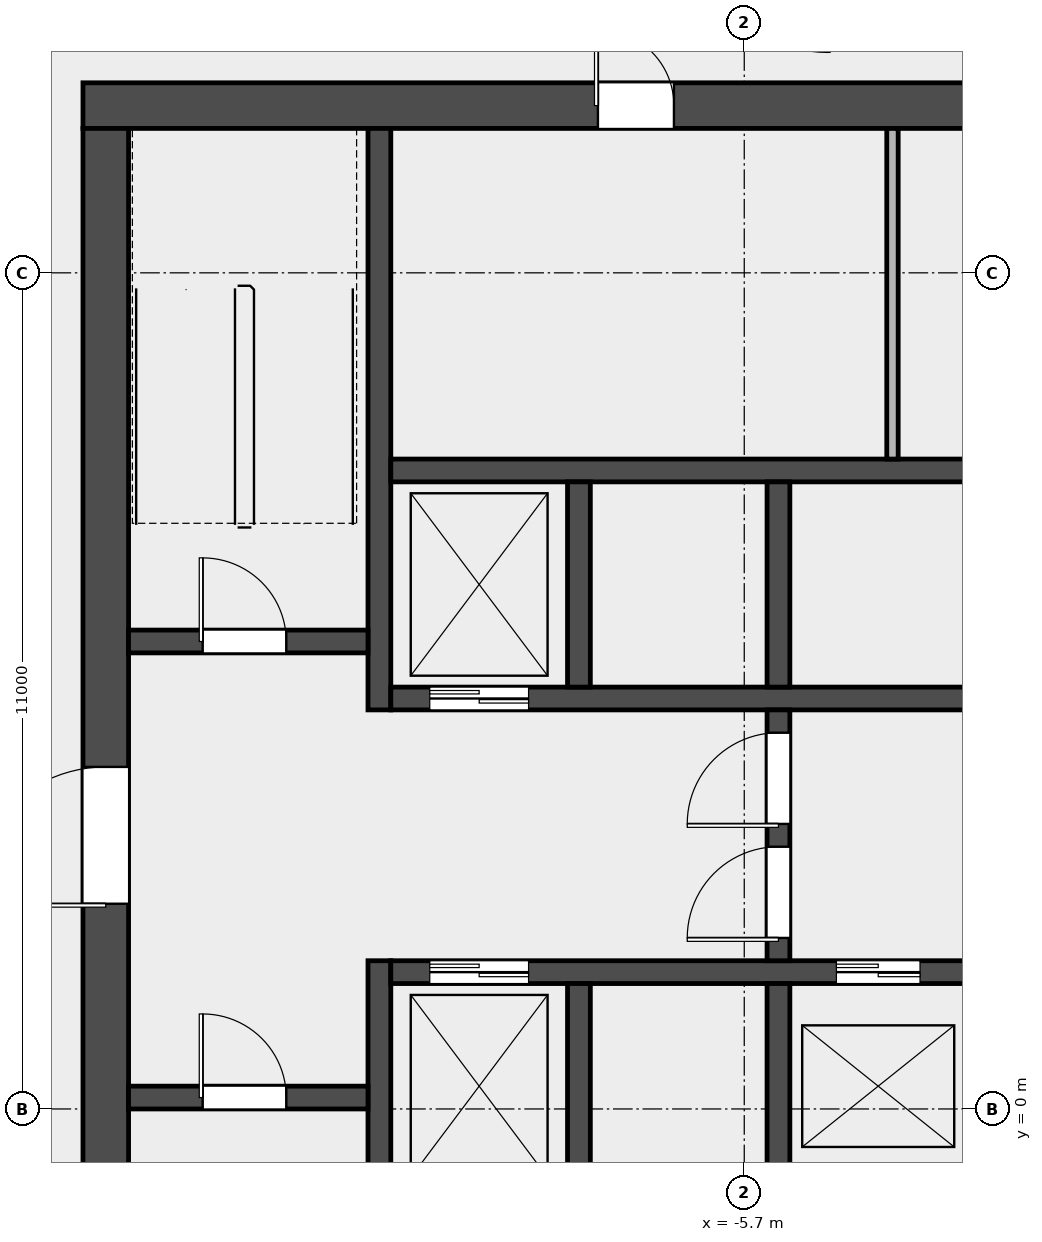
"""IFC4 building model, lengths in metres.
Left out: names, types, materials, properties, quantities, classifications, styles, units other than length and angle.
Written with IfcOpenShell. Run it as: python <this file> out.ifc"""

import sys

from ifc_helpers import new_model, si_unit, direction, frame, frame_2d, origin, place, context, subcontext, project, spatial, rectangle, extrude, element, fill, save


model = new_model("IFC4")
c1 = context("Model", 3, precision=1e-05, world=origin(), true_north=direction((0.0, 1.0)))
c2 = subcontext(c1, "Body", "Model", "MODEL_VIEW")
j1 = project(units=[si_unit("LENGTHUNIT", "METRE"), si_unit("PLANEANGLEUNIT", "RADIAN")], contexts=[c1])
p1 = place(None, origin())
s1 = spatial("IfcSite", under=j1, at=p1, CompositionType="ELEMENT")
p2 = place(p1, origin())
s2 = spatial("IfcBuilding", under=s1, at=p2, CompositionType="ELEMENT")
p3 = place(p2, frame((0.0, 0.0, 201.0)))
s3 = spatial("IfcBuildingStorey", under=s2, at=p3, CompositionType="ELEMENT", Elevation=201.0)
p4 = place(p3, frame((-14.4, 13.2, 0.0), z_axis=(0.0, 0.0, 1.0), x_axis=(1.0, 0.0, 0.0)))
e1 = element("IfcWall", 1, at=p4, inside=s3, PredefinedType="SHEAR", context=c2, shape_type="SweptSolid", body=[
    extrude(rectangle(XDim=28.8, YDim=0.6, at=frame_2d((14.4, 0.0))), origin(), (0.0, 0.0, 1.0), 3.7),
])
p5 = place(p4, frame((6.775, 0.0, 0.0)))
e2 = element("IfcOpeningElement", 2, at=p5, cuts=e1, PredefinedType="OPENING", context=c2, shape_type="SweptSolid", body=[
    extrude(rectangle(XDim=1.0, YDim=2.1, at=frame_2d((0.5, 1.05))), frame((0.0, 0.312, 0.0), z_axis=(0.0, -1.0, 0.0), x_axis=(1.0, 0.0, 0.0)), (0.0, 0.0, 1.0), 0.624),
])
p6 = place(p4, frame((13.525, 0.0, 0.0)))
e3 = element("IfcOpeningElement", 3, at=p6, cuts=e1, PredefinedType="OPENING", context=c2, shape_type="SweptSolid", body=[
    extrude(rectangle(XDim=1.0, YDim=2.1, at=frame_2d((0.5, 1.05))), frame((0.0, 0.312, 0.0), z_axis=(0.0, -1.0, 0.0), x_axis=(1.0, 0.0, 0.0)), (0.0, 0.0, 1.0), 0.624),
])
p7 = place(p4, frame((20.65, 0.0, 0.0)))
e4 = element("IfcOpeningElement", 4, at=p7, cuts=e1, PredefinedType="OPENING", context=c2, shape_type="SweptSolid", body=[
    extrude(rectangle(XDim=1.0, YDim=2.1, at=frame_2d((0.5, 1.05))), frame((0.0, 0.312, 0.0), z_axis=(0.0, -1.0, 0.0), x_axis=(1.0, 0.0, 0.0)), (0.0, 0.0, 1.0), 0.624),
])
p8 = place(p3, frame((-14.1, -6.6, 0.0), z_axis=(0.0, 0.0, 1.0), x_axis=(0.0, 1.0, 0.0)))
e5 = element("IfcWall", 5, at=p8, inside=s3, PredefinedType="SHEAR", context=c2, shape_type="SweptSolid", body=[
    extrude(rectangle(XDim=19.5, YDim=0.6, at=frame_2d((9.75, 0.0))), origin(), (0.0, 0.0, 1.0), 3.7),
])
p9 = place(p8, frame((9.3, 0.0, 0.0)))
e6 = element("IfcOpeningElement", 6, at=p9, cuts=e5, PredefinedType="OPENING", context=c2, shape_type="SweptSolid", body=[
    extrude(rectangle(XDim=1.8, YDim=2.1, at=frame_2d((0.9, 1.05))), frame((0.0, 0.312, 0.0), z_axis=(0.0, -1.0, 0.0), x_axis=(1.0, 0.0, 0.0)), (0.0, 0.0, 1.0), 0.624),
])
p10 = place(p3, frame((-10.5, -6.6, 0.0), z_axis=(0.0, 0.0, 1.0), x_axis=(0.0, 1.0, 0.0)))
e7 = element("IfcWall", 7, at=p10, inside=s3, PredefinedType="SHEAR", context=c2, shape_type="SweptSolid", body=[
    extrude(rectangle(XDim=8.55, YDim=0.3, at=frame_2d((4.275, 0.0))), origin(), (0.0, 0.0, 1.0), 3.7),
])
p11 = place(p3, frame((-10.5, 5.25, 0.0), z_axis=(0.0, 0.0, 1.0), x_axis=(0.0, 1.0, 0.0)))
e8 = element("IfcWall", 8, at=p11, inside=s3, PredefinedType="SHEAR", context=c2, shape_type="SweptSolid", body=[
    extrude(rectangle(XDim=7.65, YDim=0.3, at=frame_2d((3.825, 0.0))), origin(), (0.0, 0.0, 1.0), 3.7),
])
p12 = place(p3, frame((-13.8, 0.15, 0.0), z_axis=(0.0, 0.0, 1.0), x_axis=(1.0, 0.0, 0.0)))
e9 = element("IfcWall", 9, at=p12, inside=s3, PredefinedType="SOLIDWALL", context=c2, shape_type="SweptSolid", body=[
    extrude(rectangle(XDim=3.15, YDim=0.3, at=frame_2d((1.575, 0.0))), origin(), (0.0, 0.0, 1.0), 3.7),
])
p13 = place(p12, frame((0.975, 0.0, 0.0)))
e10 = element("IfcOpeningElement", 10, at=p13, cuts=e9, PredefinedType="OPENING", context=c2, shape_type="SweptSolid", body=[
    extrude(rectangle(XDim=1.1, YDim=2.1, at=frame_2d((0.55, 1.05))), frame((0.0, 0.162, 0.0), z_axis=(0.0, -1.0, 0.0), x_axis=(1.0, 0.0, 0.0)), (0.0, 0.0, 1.0), 0.324),
])
p14 = place(p3, frame((-13.8, 6.15, 0.0), z_axis=(0.0, 0.0, 1.0), x_axis=(1.0, 0.0, 0.0)))
e11 = element("IfcWall", 11, at=p14, inside=s3, PredefinedType="SOLIDWALL", context=c2, shape_type="SweptSolid", body=[
    extrude(rectangle(XDim=3.15, YDim=0.3, at=frame_2d((1.575, 0.0))), origin(), (0.0, 0.0, 1.0), 3.7),
])
p15 = place(p14, frame((0.975, 0.0, 0.0)))
e12 = element("IfcOpeningElement", 12, at=p15, cuts=e11, PredefinedType="OPENING", context=c2, shape_type="SweptSolid", body=[
    extrude(rectangle(XDim=1.1, YDim=2.1, at=frame_2d((0.55, 1.05))), frame((0.0, 0.162, 0.0), z_axis=(0.0, -1.0, 0.0), x_axis=(1.0, 0.0, 0.0)), (0.0, 0.0, 1.0), 0.324),
])
p16 = place(p3, frame((-10.35, 1.8, 0.0), z_axis=(0.0, 0.0, 1.0), x_axis=(1.0, 0.0, 0.0)))
e13 = element("IfcWall", 13, at=p16, inside=s3, PredefinedType="SOLIDWALL", context=c2, shape_type="SweptSolid", body=[
    extrude(rectangle(XDim=20.7, YDim=0.3, at=frame_2d((10.35, 0.0))), origin(), (0.0, 0.0, 1.0), 3.7),
])
p17 = place(p16, frame((0.512, 0.0, 0.0)))
e14 = element("IfcOpeningElement", 14, at=p17, cuts=e13, PredefinedType="OPENING", context=c2, shape_type="SweptSolid", body=[
    extrude(rectangle(XDim=1.3, YDim=2.1, at=frame_2d((0.65, 1.05))), frame((0.0, 0.162, 0.0), z_axis=(0.0, -1.0, 0.0), x_axis=(1.0, 0.0, 0.0)), (0.0, 0.0, 1.0), 0.324),
])
p18 = place(p16, frame((5.863, 0.0, 0.0)))
e15 = element("IfcOpeningElement", 15, at=p18, cuts=e13, PredefinedType="OPENING", context=c2, shape_type="SweptSolid", body=[
    extrude(rectangle(XDim=1.1, YDim=2.1, at=frame_2d((0.55, 1.05))), frame((0.0, 0.162, 0.0), z_axis=(0.0, -1.0, 0.0), x_axis=(1.0, 0.0, 0.0)), (0.0, 0.0, 1.0), 0.324),
])
p19 = place(p16, frame((8.488, 0.0, 0.0)))
e16 = element("IfcOpeningElement", 16, at=p19, cuts=e13, PredefinedType="OPENING", context=c2, shape_type="SweptSolid", body=[
    extrude(rectangle(XDim=1.1, YDim=2.1, at=frame_2d((0.55, 1.05))), frame((0.0, 0.162, 0.0), z_axis=(0.0, -1.0, 0.0), x_axis=(1.0, 0.0, 0.0)), (0.0, 0.0, 1.0), 0.324),
])
p20 = place(p16, frame((11.113, 0.0, 0.0)))
e17 = element("IfcOpeningElement", 17, at=p20, cuts=e13, PredefinedType="OPENING", context=c2, shape_type="SweptSolid", body=[
    extrude(rectangle(XDim=1.1, YDim=2.1, at=frame_2d((0.55, 1.05))), frame((0.0, 0.162, 0.0), z_axis=(0.0, -1.0, 0.0), x_axis=(1.0, 0.0, 0.0)), (0.0, 0.0, 1.0), 0.324),
])
p21 = place(p16, frame((13.738, 0.0, 0.0)))
e18 = element("IfcOpeningElement", 18, at=p21, cuts=e13, PredefinedType="OPENING", context=c2, shape_type="SweptSolid", body=[
    extrude(rectangle(XDim=1.1, YDim=2.1, at=frame_2d((0.55, 1.05))), frame((0.0, 0.162, 0.0), z_axis=(0.0, -1.0, 0.0), x_axis=(1.0, 0.0, 0.0)), (0.0, 0.0, 1.0), 0.324),
])
p22 = place(p16, frame((16.363, 0.0, 0.0)))
e19 = element("IfcOpeningElement", 19, at=p22, cuts=e13, PredefinedType="OPENING", context=c2, shape_type="SweptSolid", body=[
    extrude(rectangle(XDim=1.1, YDim=2.1, at=frame_2d((0.55, 1.05))), frame((0.0, 0.162, 0.0), z_axis=(0.0, -1.0, 0.0), x_axis=(1.0, 0.0, 0.0)), (0.0, 0.0, 1.0), 0.324),
])
p23 = place(p16, frame((18.988, 0.0, 0.0)))
e20 = element("IfcOpeningElement", 20, at=p23, cuts=e13, PredefinedType="OPENING", context=c2, shape_type="SweptSolid", body=[
    extrude(rectangle(XDim=1.1, YDim=2.1, at=frame_2d((0.55, 1.05))), frame((0.0, 0.162, 0.0), z_axis=(0.0, -1.0, 0.0), x_axis=(1.0, 0.0, 0.0)), (0.0, 0.0, 1.0), 0.324),
])
p24 = place(p3, frame((-10.35, 5.4, 0.0), z_axis=(0.0, 0.0, 1.0), x_axis=(1.0, 0.0, 0.0)))
e21 = element("IfcWall", 21, at=p24, inside=s3, PredefinedType="SOLIDWALL", context=c2, shape_type="SweptSolid", body=[
    extrude(rectangle(XDim=20.7, YDim=0.3, at=frame_2d((10.35, 0.0))), origin(), (0.0, 0.0, 1.0), 3.7),
])
p25 = place(p24, frame((0.512, 0.0, 0.0)))
e22 = element("IfcOpeningElement", 22, at=p25, cuts=e21, PredefinedType="OPENING", context=c2, shape_type="SweptSolid", body=[
    extrude(rectangle(XDim=1.3, YDim=2.1, at=frame_2d((0.65, 1.05))), frame((0.0, 0.162, 0.0), z_axis=(0.0, -1.0, 0.0), x_axis=(1.0, 0.0, 0.0)), (0.0, 0.0, 1.0), 0.324),
])
p26 = place(p3, frame((-10.35, 8.4, 0.0), z_axis=(0.0, 0.0, 1.0), x_axis=(1.0, 0.0, 0.0)))
e23 = element("IfcWall", 23, at=p26, inside=s3, PredefinedType="SOLIDWALL", context=c2, shape_type="SweptSolid", body=[
    extrude(rectangle(XDim=20.7, YDim=0.3, at=frame_2d((10.35, 0.0))), origin(), (0.0, 0.0, 1.0), 3.7),
])
for number, where, z_axis, x_axis in (
    (24, (-7.875, -1.05, 0.0), (0.0, 0.0, 1.0), (0.0, 1.0, 0.0)),
    (25, (-5.25, -1.05, 0.0), (0.0, 0.0, 1.0), (0.0, 1.0, 0.0)),
    (26, (-7.875, 5.55, 0.0), (0.0, 0.0, 1.0), (0.0, 1.0, 0.0)),
    (27, (-5.25, 5.55, 0.0), (0.0, 0.0, 1.0), (0.0, 1.0, 0.0)),
):
    element("IfcWall", number, at=place(p3, frame(where, z_axis=z_axis, x_axis=x_axis)), inside=s3, PredefinedType="SOLIDWALL", context=c2, shape_type="SweptSolid", body=[
        extrude(rectangle(XDim=2.7, YDim=0.3, at=frame_2d((1.35, 0.0))), origin(), (0.0, 0.0, 1.0), 3.7),
    ])
p27 = place(p3, frame((-5.25, 1.95, 0.0), z_axis=(0.0, 0.0, 1.0), x_axis=(0.0, 1.0, 0.0)))
e28 = element("IfcWall", 28, at=p27, inside=s3, PredefinedType="SOLIDWALL", context=c2, shape_type="SweptSolid", body=[
    extrude(rectangle(XDim=3.3, YDim=0.3, at=frame_2d((1.65, 0.0))), origin(), (0.0, 0.0, 1.0), 3.7),
])
p28 = place(p27, frame((0.3, 0.0, 0.0)))
e29 = element("IfcOpeningElement", 29, at=p28, cuts=e28, PredefinedType="OPENING", context=c2, shape_type="SweptSolid", body=[
    extrude(rectangle(XDim=1.2, YDim=2.1, at=frame_2d((0.6, 1.05))), frame((0.0, 0.162, 0.0), z_axis=(0.0, -1.0, 0.0), x_axis=(1.0, 0.0, 0.0)), (0.0, 0.0, 1.0), 0.324),
])
p29 = place(p27, frame((1.8, 0.0, 0.0)))
e30 = element("IfcOpeningElement", 30, at=p29, cuts=e28, PredefinedType="OPENING", context=c2, shape_type="SweptSolid", body=[
    extrude(rectangle(XDim=1.2, YDim=2.1, at=frame_2d((0.6, 1.05))), frame((0.0, 0.162, 0.0), z_axis=(0.0, -1.0, 0.0), x_axis=(1.0, 0.0, 0.0)), (0.0, 0.0, 1.0), 0.324),
])
p30 = place(p3, frame((-3.75, 8.55, 0.0), z_axis=(0.0, 0.0, 1.0), x_axis=(0.0, 1.0, 0.0)))
e31 = element("IfcWall", 31, at=p30, inside=s3, PredefinedType="PARTITIONING", context=c2, shape_type="SweptSolid", body=[
    extrude(rectangle(XDim=4.35, YDim=0.15, at=frame_2d((2.175, 0.0))), origin(), (0.0, 0.0, 1.0), 3.7),
])
p31 = place(p13, origin())
e32 = element("IfcDoor", 32, at=p31, inside=s3, OperationType="SINGLE_SWING_LEFT", PredefinedType="DOOR", context=c2, shape_type="SweptSolid", body=[
    extrude(rectangle(XDim=1.1, YDim=2.1, at=frame_2d((0.55, 1.05))), frame((0.0, 0.025, 0.0), z_axis=(0.0, -1.0, 0.0), x_axis=(1.0, 0.0, 0.0)), (0.0, 0.0, 1.0), 0.05),
])
fill(e10, e32)
p32 = place(p15, origin())
e33 = element("IfcDoor", 33, at=p32, inside=s3, OperationType="SINGLE_SWING_LEFT", PredefinedType="DOOR", context=c2, shape_type="SweptSolid", body=[
    extrude(rectangle(XDim=1.1, YDim=2.1, at=frame_2d((0.55, 1.05))), frame((0.0, 0.025, 0.0), z_axis=(0.0, -1.0, 0.0), x_axis=(1.0, 0.0, 0.0)), (0.0, 0.0, 1.0), 0.05),
])
fill(e12, e33)
p33 = place(p9, origin())
e34 = element("IfcDoor", 34, at=p33, inside=s3, OperationType="DOUBLE_DOOR_SINGLE_SWING", PredefinedType="DOOR", context=c2, shape_type="SweptSolid", body=[
    extrude(rectangle(XDim=1.8, YDim=2.1, at=frame_2d((0.9, 1.05))), frame((0.0, 0.025, 0.0), z_axis=(0.0, -1.0, 0.0), x_axis=(1.0, 0.0, 0.0)), (0.0, 0.0, 1.0), 0.05),
])
fill(e6, e34)
p34 = place(p28, origin())
e35 = element("IfcDoor", 35, at=p34, inside=s3, OperationType="SINGLE_SWING_LEFT", PredefinedType="DOOR", context=c2, shape_type="SweptSolid", body=[
    extrude(rectangle(XDim=1.2, YDim=2.1, at=frame_2d((0.6, 1.05))), frame((0.0, 0.025, 0.0), z_axis=(0.0, -1.0, 0.0), x_axis=(1.0, 0.0, 0.0)), (0.0, 0.0, 1.0), 0.05),
])
fill(e29, e35)
p35 = place(p29, origin())
e36 = element("IfcDoor", 36, at=p35, inside=s3, OperationType="SINGLE_SWING_RIGHT", PredefinedType="DOOR", context=c2, shape_type="SweptSolid", body=[
    extrude(rectangle(XDim=1.2, YDim=2.1, at=frame_2d((0.6, 1.05))), frame((0.0, 0.025, 0.0), z_axis=(0.0, -1.0, 0.0), x_axis=(1.0, 0.0, 0.0)), (0.0, 0.0, 1.0), 0.05),
])
fill(e30, e36)
p36 = place(p17, origin())
e37 = element("IfcDoor", 37, at=p36, inside=s3, OperationType="DOUBLE_DOOR_SLIDING", PredefinedType="DOOR", context=c2, shape_type="SweptSolid", body=[
    extrude(rectangle(XDim=1.3, YDim=2.1, at=frame_2d((0.65, 1.05))), frame((0.0, 0.025, 0.0), z_axis=(0.0, -1.0, 0.0), x_axis=(1.0, 0.0, 0.0)), (0.0, 0.0, 1.0), 0.05),
])
fill(e14, e37)
p37 = place(p18, origin())
e38 = element("IfcDoor", 38, at=p37, inside=s3, OperationType="DOUBLE_DOOR_SLIDING", PredefinedType="DOOR", context=c2, shape_type="SweptSolid", body=[
    extrude(rectangle(XDim=1.1, YDim=2.1, at=frame_2d((0.55, 1.05))), frame((0.0, 0.025, 0.0), z_axis=(0.0, -1.0, 0.0), x_axis=(1.0, 0.0, 0.0)), (0.0, 0.0, 1.0), 0.05),
])
fill(e15, e38)
p38 = place(p25, origin())
e39 = element("IfcDoor", 39, at=p38, inside=s3, OperationType="DOUBLE_DOOR_SLIDING", PredefinedType="DOOR", context=c2, shape_type="SweptSolid", body=[
    extrude(rectangle(XDim=1.3, YDim=2.1, at=frame_2d((0.65, 1.05))), frame((0.0, 0.025, 0.0), z_axis=(0.0, -1.0, 0.0), x_axis=(1.0, 0.0, 0.0)), (0.0, 0.0, 1.0), 0.05),
])
fill(e22, e39)
p39 = place(p5, origin())
e40 = element("IfcDoor", 40, at=p39, inside=s3, OperationType="SINGLE_SWING_LEFT", PredefinedType="DOOR", context=c2, shape_type="SweptSolid", body=[
    extrude(rectangle(XDim=1.0, YDim=2.1, at=frame_2d((0.5, 1.05))), frame((0.0, 0.025, 0.0), z_axis=(0.0, -1.0, 0.0), x_axis=(1.0, 0.0, 0.0)), (0.0, 0.0, 1.0), 0.05),
])
fill(e2, e40)
save(model, sys.argv[1])
